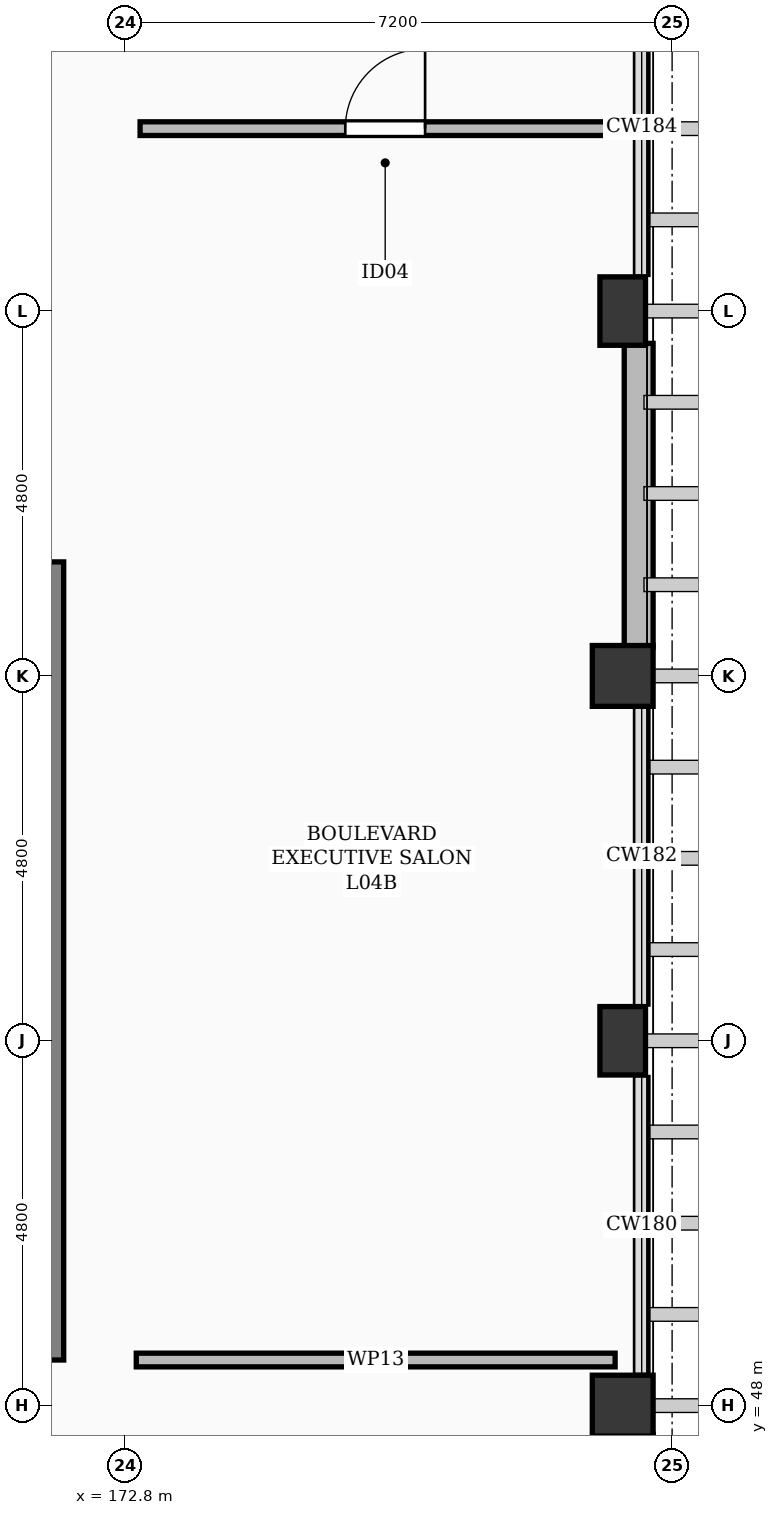
"""IFC4 building model, lengths in metres.
Left out: names, types, materials, properties, quantities, classifications, styles, units other than length and angle.
Written with IfcOpenShell. Run it as: python <this file> out.ifc"""

import sys

from ifc_helpers import new_model, si_unit, direction, frame, frame_2d, origin, origin_2d, place, context, subcontext, project, spatial, rectangle, extrude, element, fill, save


model = new_model("IFC4")
c1 = context("Model", 3, precision=1e-05, world=origin(), true_north=direction((0.0, 1.0)))
c2 = subcontext(c1, "Body", "Model", "MODEL_VIEW")
j1 = project(units=[si_unit("LENGTHUNIT", "METRE"), si_unit("PLANEANGLEUNIT", "RADIAN")], contexts=[c1])
p1 = place(None, origin())
s1 = spatial("IfcSite", under=j1, at=p1, CompositionType="ELEMENT")
p2 = place(p1, origin())
s2 = spatial("IfcBuilding", under=s1, at=p2, CompositionType="ELEMENT")
p3 = place(p2, frame((0.0, 0.0, 21.0)))
s3 = spatial("IfcBuildingStorey", under=s2, at=p3, CompositionType="ELEMENT", Elevation=21.0)
for number, where, z_axis, x_axis in (
    (1, (179.35, 48.0, 0.0), (0.0, 0.0, 1.0), (1.0, 0.0, 0.0)),
    (2, (179.35, 57.6, 0.0), (0.0, 0.0, 1.0), (1.0, 0.0, 0.0)),
):
    element("IfcColumn", number, at=place(p3, frame(where, z_axis=z_axis, x_axis=x_axis)), inside=s3, PredefinedType="COLUMN", context=c2, shape_type="SweptSolid", body=[
        extrude(rectangle(XDim=0.8, YDim=0.8, at=origin_2d()), origin(), (0.0, 0.0, 1.0), 3.6),
    ])
for number, where, z_axis, x_axis in (
    (3, (179.35, 52.8, -0.26), (0.0, 0.0, 1.0), (1.0, 0.0, 0.0)),
    (4, (179.35, 62.4, -0.26), (0.0, 0.0, 1.0), (1.0, 0.0, 0.0)),
):
    element("IfcColumn", number, at=place(p3, frame(where, z_axis=z_axis, x_axis=x_axis)), inside=s3, PredefinedType="COLUMN", context=c2, shape_type="SweptSolid", body=[
        extrude(rectangle(XDim=0.6, YDim=0.9, at=origin_2d()), origin(), (0.0, 0.0, 1.0), 3.86),
    ])
for number, where, z_axis, x_axis in (
    (5, (179.56, 47.625, 0.0), (0.0, 0.0, 1.0), (0.0, -1.0, 0.0)),
    (6, (179.56, 61.975, 0.0), (0.0, 0.0, 1.0), (0.0, -1.0, 0.0)),
):
    element("IfcWall", number, at=place(p3, frame(where, z_axis=z_axis, x_axis=x_axis)), inside=s3, PredefinedType="SOLIDWALL", context=c2, shape_type="SweptSolid", body=[
        extrude(rectangle(XDim=4.0, YDim=0.38, at=frame_2d((2.0, 0.0))), origin(), (0.0, 0.0, 1.0), 2.582),
    ])
p4 = place(p3, frame((171.77, 48.6, 0.0), z_axis=(0.0, 0.0, 1.0), x_axis=(0.0, 1.0, 0.0)))
e7 = element("IfcWall", 7, at=p4, inside=s3, PredefinedType="SHEAR", context=c2, shape_type="SweptSolid", body=[
    extrude(rectangle(XDim=10.5, YDim=0.45, at=frame_2d((5.25, 0.0))), origin(), (0.0, 0.0, 1.0), 3.34),
])
p5 = place(p3, frame((172.95, 48.6, 0.0), z_axis=(0.0, 0.0, 1.0), x_axis=(1.0, 0.0, 0.0)))
e8 = element("IfcWall", 8, at=p5, inside=s3, PredefinedType="PARTITIONING", context=c2, shape_type="SweptSolid", body=[
    extrude(rectangle(XDim=6.3, YDim=0.18, at=frame_2d((3.15, 0.0))), origin(), (0.0, 0.0, 1.0), 2.582),
])
p6 = place(p3, frame((173.0, 64.8, 0.0), z_axis=(0.0, 0.0, 1.0), x_axis=(1.0, 0.0, 0.0)))
e9 = element("IfcWall", 9, at=p6, inside=s3, PredefinedType="PARTITIONING", context=c2, shape_type="SweptSolid", body=[
    extrude(rectangle(XDim=6.2, YDim=0.18, at=frame_2d((3.1, 0.0))), origin(), (0.0, 0.0, 1.0), 2.582),
])
p7 = place(p6, frame((2.7, 0.0, 0.0)))
e10 = element("IfcOpeningElement", 10, at=p7, cuts=e9, PredefinedType="OPENING", context=c2, shape_type="SweptSolid", body=[
    extrude(rectangle(XDim=1.05, YDim=2.18, at=frame_2d((0.525, 1.09))), frame((0.0, 0.102, 0.0), z_axis=(0.0, -1.0, 0.0), x_axis=(1.0, 0.0, 0.0)), (0.0, 0.0, 1.0), 0.204),
])
p8 = place(p7, origin())
e11 = element("IfcDoor", 11, at=p8, inside=s3, OperationType="SINGLE_SWING_RIGHT", PredefinedType="DOOR", context=c2, shape_type="SweptSolid", body=[
    extrude(rectangle(XDim=1.05, YDim=2.18, at=frame_2d((0.525, 1.09))), frame((0.0, 0.025, 0.0), z_axis=(0.0, -1.0, 0.0), x_axis=(1.0, 0.0, 0.0)), (0.0, 0.0, 1.0), 0.05),
])
fill(e10, e11)
save(model, sys.argv[1])
